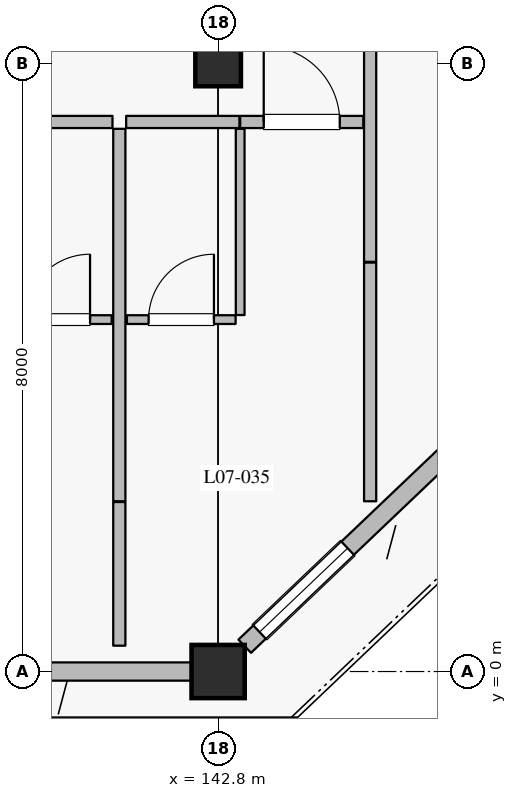
"""IFC4 building model, lengths in metres.
Left out: names, types, materials, properties, quantities, classifications, styles, units other than length and angle.
Written with IfcOpenShell. Run it as: python <this file> out.ifc"""

import sys

from ifc_helpers import new_model, si_unit, direction, frame, frame_2d, origin, origin_2d, place, context, subcontext, project, spatial, rectangle, extrude, element, fill, save


model = new_model("IFC4")
c1 = context("Model", 3, precision=1e-05, world=origin(), true_north=direction((0.0, 1.0)))
c2 = subcontext(c1, "Body", "Model", "MODEL_VIEW")
j1 = project(units=[si_unit("LENGTHUNIT", "METRE"), si_unit("PLANEANGLEUNIT", "RADIAN")], contexts=[c1])
p1 = place(None, origin())
s1 = spatial("IfcSite", under=j1, at=p1, CompositionType="ELEMENT")
p2 = place(p1, origin())
s2 = spatial("IfcBuilding", under=s1, at=p2, CompositionType="ELEMENT")
p3 = place(p2, frame((0.0, 0.0, 32.4)))
s3 = spatial("IfcBuildingStorey", under=s2, at=p3, CompositionType="ELEMENT", Elevation=32.4)
p4 = place(p3, frame((142.8, 0.0, 0.0), z_axis=(0.0, 0.0, 1.0), x_axis=(1.0, 0.0, 0.0)))
e1 = element("IfcColumn", 1, at=p4, inside=s3, PredefinedType="COLUMN", context=c2, shape_type="SweptSolid", body=[
    extrude(rectangle(XDim=0.7, YDim=0.7, at=origin_2d()), origin(), (0.0, 0.0, 1.0), 3.6),
])
p5 = place(p3, frame((142.8, 8.0, 0.0), z_axis=(0.0, 0.0, 1.0), x_axis=(1.0, 0.0, 0.0)))
e2 = element("IfcColumn", 2, at=p5, inside=s3, PredefinedType="COLUMN", context=c2, shape_type="SweptSolid", body=[
    extrude(rectangle(XDim=0.6, YDim=0.6, at=origin_2d()), origin(), (0.0, 0.0, 1.0), 3.6),
])
p6 = place(p3, frame((142.45, 0.0, 0.0), z_axis=(0.0, 0.0, 1.0), x_axis=(-1.0, 0.0, 0.0)))
e3 = element("IfcWall", 3, at=p6, inside=s3, PredefinedType="SOLIDWALL", context=c2, shape_type="SweptSolid", body=[
    extrude(rectangle(XDim=7.7, YDim=0.24, at=frame_2d((3.85, 0.0))), origin(), (0.0, 0.0, 1.0), 2.94),
])
p7 = place(p6, frame((1.85, 0.0, 0.0)))
e4 = element("IfcOpeningElement", 4, at=p7, cuts=e3, PredefinedType="OPENING", context=c2, shape_type="SweptSolid", body=[
    extrude(rectangle(XDim=1.5, YDim=2.25, at=frame_2d((0.75, 1.125))), frame((0.0, 0.13, 0.0), z_axis=(0.0, -1.0, 0.0), x_axis=(1.0, 0.0, 0.0)), (0.0, 0.0, 1.0), 0.26),
])
p8 = place(p6, frame((5.1, 0.0, 0.8)))
e5 = element("IfcOpeningElement", 5, at=p8, cuts=e3, PredefinedType="OPENING", context=c2, shape_type="SweptSolid", body=[
    extrude(rectangle(XDim=1.6, YDim=1.6, at=frame_2d((0.8, 0.8))), frame((0.0, 0.13, 0.0), z_axis=(0.0, -1.0, 0.0), x_axis=(1.0, 0.0, 0.0)), (0.0, 0.0, 1.0), 0.26),
])
p9 = place(p3, frame((150.85, 7.667, 0.0), z_axis=(0.0, 0.0, 1.0), x_axis=(-0.724116091282, -0.689678103427, 0.0)))
e6 = element("IfcWall", 6, at=p9, inside=s3, PredefinedType="SOLIDWALL", context=c2, shape_type="SweptSolid", body=[
    extrude(rectangle(XDim=10.634, YDim=0.24, at=frame_2d((5.317, 0.0))), origin(), (0.0, 0.0, 1.0), 2.94),
])
p10 = place(p9, frame((1.08, 0.0, 0.0)))
e7 = element("IfcOpeningElement", 7, at=p10, cuts=e6, PredefinedType="OPENING", context=c2, shape_type="SweptSolid", body=[
    extrude(rectangle(XDim=1.5, YDim=2.25, at=frame_2d((0.75, 1.125))), frame((0.0, 0.13, 0.0), z_axis=(0.0, -1.0, 0.0), x_axis=(1.0, 0.0, 0.0)), (0.0, 0.0, 1.0), 0.26),
])
p11 = place(p9, frame((5.276, 0.0, 0.8)))
e8 = element("IfcOpeningElement", 8, at=p11, cuts=e6, PredefinedType="OPENING", context=c2, shape_type="SweptSolid", body=[
    extrude(rectangle(XDim=1.6, YDim=1.6, at=frame_2d((0.8, 0.8))), frame((0.0, 0.13, 0.0), z_axis=(0.0, -1.0, 0.0), x_axis=(1.0, 0.0, 0.0)), (0.0, 0.0, 1.0), 0.26),
])
p12 = place(p9, frame((8.764, 0.0, 0.8)))
e9 = element("IfcOpeningElement", 9, at=p12, cuts=e6, PredefinedType="OPENING", context=c2, shape_type="SweptSolid", body=[
    extrude(rectangle(XDim=1.6, YDim=1.6, at=frame_2d((0.8, 0.8))), frame((0.0, 0.13, 0.0), z_axis=(0.0, -1.0, 0.0), x_axis=(1.0, 0.0, 0.0)), (0.0, 0.0, 1.0), 0.26),
])
p13 = place(p3, frame((139.92, 7.23, 0.0), z_axis=(0.0, 0.0, 1.0), x_axis=(1.0, 0.0, 0.0)))
e10 = element("IfcWall", 10, at=p13, inside=s3, PredefinedType="PARTITIONING", context=c2, shape_type="SweptSolid", body=[
    extrude(rectangle(XDim=1.49, YDim=0.16, at=frame_2d((0.745, 0.0))), origin(), (0.0, 0.0, 1.0), 3.335),
])
p14 = place(p3, frame((139.97, 4.63, 0.0), z_axis=(0.0, 0.0, 1.0), x_axis=(1.0, 0.0, 0.0)))
e11 = element("IfcWall", 11, at=p14, inside=s3, PredefinedType="PARTITIONING", context=c2, shape_type="SweptSolid", body=[
    extrude(rectangle(XDim=1.43, YDim=0.115, at=frame_2d((0.715, 0.0))), origin(), (0.0, 0.0, 1.0), 3.335),
])
p15 = place(p14, frame((0.285, 0.0, 0.0)))
e12 = element("IfcOpeningElement", 12, at=p15, cuts=e11, PredefinedType="OPENING", context=c2, shape_type="SweptSolid", body=[
    extrude(rectangle(XDim=0.86, YDim=2.12, at=frame_2d((0.43, 1.06))), frame((0.0, 0.067, 0.0), z_axis=(0.0, -1.0, 0.0), x_axis=(1.0, 0.0, 0.0)), (0.0, 0.0, 1.0), 0.135),
])
p16 = place(p3, frame((141.5, 0.34, 0.0), z_axis=(0.0, 0.0, 1.0), x_axis=(0.0, 1.0, 0.0)))
e13 = element("IfcWall", 13, at=p16, inside=s3, PredefinedType="PARTITIONING", context=c2, shape_type="SweptSolid", body=[
    extrude(rectangle(XDim=1.89, YDim=0.16, at=frame_2d((0.945, 0.0))), origin(), (0.0, 0.0, 1.0), 3.335),
])
p17 = place(p3, frame((141.59, 7.23, 0.0), z_axis=(0.0, 0.0, 1.0), x_axis=(1.0, 0.0, 0.0)))
e14 = element("IfcWall", 14, at=p17, inside=s3, PredefinedType="PARTITIONING", context=c2, shape_type="SweptSolid", body=[
    extrude(rectangle(XDim=1.49, YDim=0.16, at=frame_2d((0.745, 0.0))), origin(), (0.0, 0.0, 1.0), 3.335),
])
p18 = place(p3, frame((143.09, 7.23, 0.0), z_axis=(0.0, 0.0, 1.0), x_axis=(1.0, 0.0, 0.0)))
e15 = element("IfcWall", 15, at=p18, inside=s3, PredefinedType="PARTITIONING", context=c2, shape_type="SweptSolid", body=[
    extrude(rectangle(XDim=1.62, YDim=0.16, at=frame_2d((0.81, 0.0))), origin(), (0.0, 0.0, 1.0), 3.335),
])
p19 = place(p18, frame((0.31, 0.0, 0.0)))
e16 = element("IfcOpeningElement", 16, at=p19, cuts=e15, PredefinedType="OPENING", context=c2, shape_type="SweptSolid", body=[
    extrude(rectangle(XDim=1.0, YDim=2.25, at=frame_2d((0.5, 1.125))), frame((0.0, 0.09, 0.0), z_axis=(0.0, -1.0, 0.0), x_axis=(1.0, 0.0, 0.0)), (0.0, 0.0, 1.0), 0.18),
])
p20 = place(p3, frame((143.09, 4.69, 0.0), z_axis=(0.0, 0.0, 1.0), x_axis=(0.0, 1.0, 0.0)))
e17 = element("IfcWall", 17, at=p20, inside=s3, PredefinedType="PARTITIONING", context=c2, shape_type="SweptSolid", body=[
    extrude(rectangle(XDim=2.45, YDim=0.115, at=frame_2d((1.225, 0.0))), origin(), (0.0, 0.0, 1.0), 3.335),
])
p21 = place(p3, frame((141.6, 4.63, 0.0), z_axis=(0.0, 0.0, 1.0), x_axis=(1.0, 0.0, 0.0)))
e18 = element("IfcWall", 18, at=p21, inside=s3, PredefinedType="PARTITIONING", context=c2, shape_type="SweptSolid", body=[
    extrude(rectangle(XDim=1.43, YDim=0.115, at=frame_2d((0.715, 0.0))), origin(), (0.0, 0.0, 1.0), 3.335),
])
p22 = place(p21, frame((0.285, 0.0, 0.0)))
e19 = element("IfcOpeningElement", 19, at=p22, cuts=e18, PredefinedType="OPENING", context=c2, shape_type="SweptSolid", body=[
    extrude(rectangle(XDim=0.86, YDim=2.12, at=frame_2d((0.43, 1.06))), frame((0.0, 0.067, 0.0), z_axis=(0.0, -1.0, 0.0), x_axis=(1.0, 0.0, 0.0)), (0.0, 0.0, 1.0), 0.135),
])
p23 = place(p3, frame((141.5, 2.24, 0.0), z_axis=(0.0, 0.0, 1.0), x_axis=(0.0, 1.0, 0.0)))
e20 = element("IfcWall", 20, at=p23, inside=s3, PredefinedType="PARTITIONING", context=c2, shape_type="SweptSolid", body=[
    extrude(rectangle(XDim=4.9, YDim=0.16, at=frame_2d((2.45, 0.0))), origin(), (0.0, 0.0, 1.0), 3.335),
])
p24 = place(p3, frame((144.8, 2.24, 0.0), z_axis=(0.0, 0.0, 1.0), x_axis=(0.0, 1.0, 0.0)))
e21 = element("IfcWall", 21, at=p24, inside=s3, PredefinedType="PARTITIONING", context=c2, shape_type="SweptSolid", body=[
    extrude(rectangle(XDim=3.14, YDim=0.16, at=frame_2d((1.57, 0.0))), origin(), (0.0, 0.0, 1.0), 3.335),
])
p25 = place(p3, frame((144.8, 5.39, 0.0), z_axis=(0.0, 0.0, 1.0), x_axis=(0.0, 1.0, 0.0)))
e22 = element("IfcWall", 22, at=p25, inside=s3, PredefinedType="PARTITIONING", context=c2, shape_type="SweptSolid", body=[
    extrude(rectangle(XDim=9.15, YDim=0.16, at=frame_2d((4.575, 0.0))), origin(), (0.0, 0.0, 1.0), 3.335),
])
p26 = place(p12, origin())
e23 = element("IfcWindow", 23, at=p26, inside=s3, PartitioningType="SINGLE_PANEL", PredefinedType="WINDOW", context=c2, shape_type="SweptSolid", body=[
    extrude(rectangle(XDim=1.6, YDim=1.6, at=frame_2d((0.8, 0.8))), frame((0.0, 0.03, 0.0), z_axis=(0.0, -1.0, 0.0), x_axis=(1.0, 0.0, 0.0)), (0.0, 0.0, 1.0), 0.06),
])
fill(e9, e23)
p27 = place(p15, origin())
e24 = element("IfcDoor", 24, at=p27, inside=s3, OperationType="SINGLE_SWING_RIGHT", PredefinedType="DOOR", context=c2, shape_type="SweptSolid", body=[
    extrude(rectangle(XDim=0.86, YDim=2.12, at=frame_2d((0.43, 1.06))), frame((0.0, 0.025, 0.0), z_axis=(0.0, -1.0, 0.0), x_axis=(1.0, 0.0, 0.0)), (0.0, 0.0, 1.0), 0.05),
])
fill(e12, e24)
p28 = place(p19, origin())
e25 = element("IfcDoor", 25, at=p28, inside=s3, OperationType="SINGLE_SWING_LEFT", PredefinedType="DOOR", context=c2, shape_type="SweptSolid", body=[
    extrude(rectangle(XDim=1.0, YDim=2.25, at=frame_2d((0.5, 1.125))), frame((0.0, 0.025, 0.0), z_axis=(0.0, -1.0, 0.0), x_axis=(1.0, 0.0, 0.0)), (0.0, 0.0, 1.0), 0.05),
])
fill(e16, e25)
p29 = place(p22, origin())
e26 = element("IfcDoor", 26, at=p29, inside=s3, OperationType="SINGLE_SWING_RIGHT", PredefinedType="DOOR", context=c2, shape_type="SweptSolid", body=[
    extrude(rectangle(XDim=0.86, YDim=2.12, at=frame_2d((0.43, 1.06))), frame((0.0, 0.025, 0.0), z_axis=(0.0, -1.0, 0.0), x_axis=(1.0, 0.0, 0.0)), (0.0, 0.0, 1.0), 0.05),
])
fill(e19, e26)
save(model, sys.argv[1])
